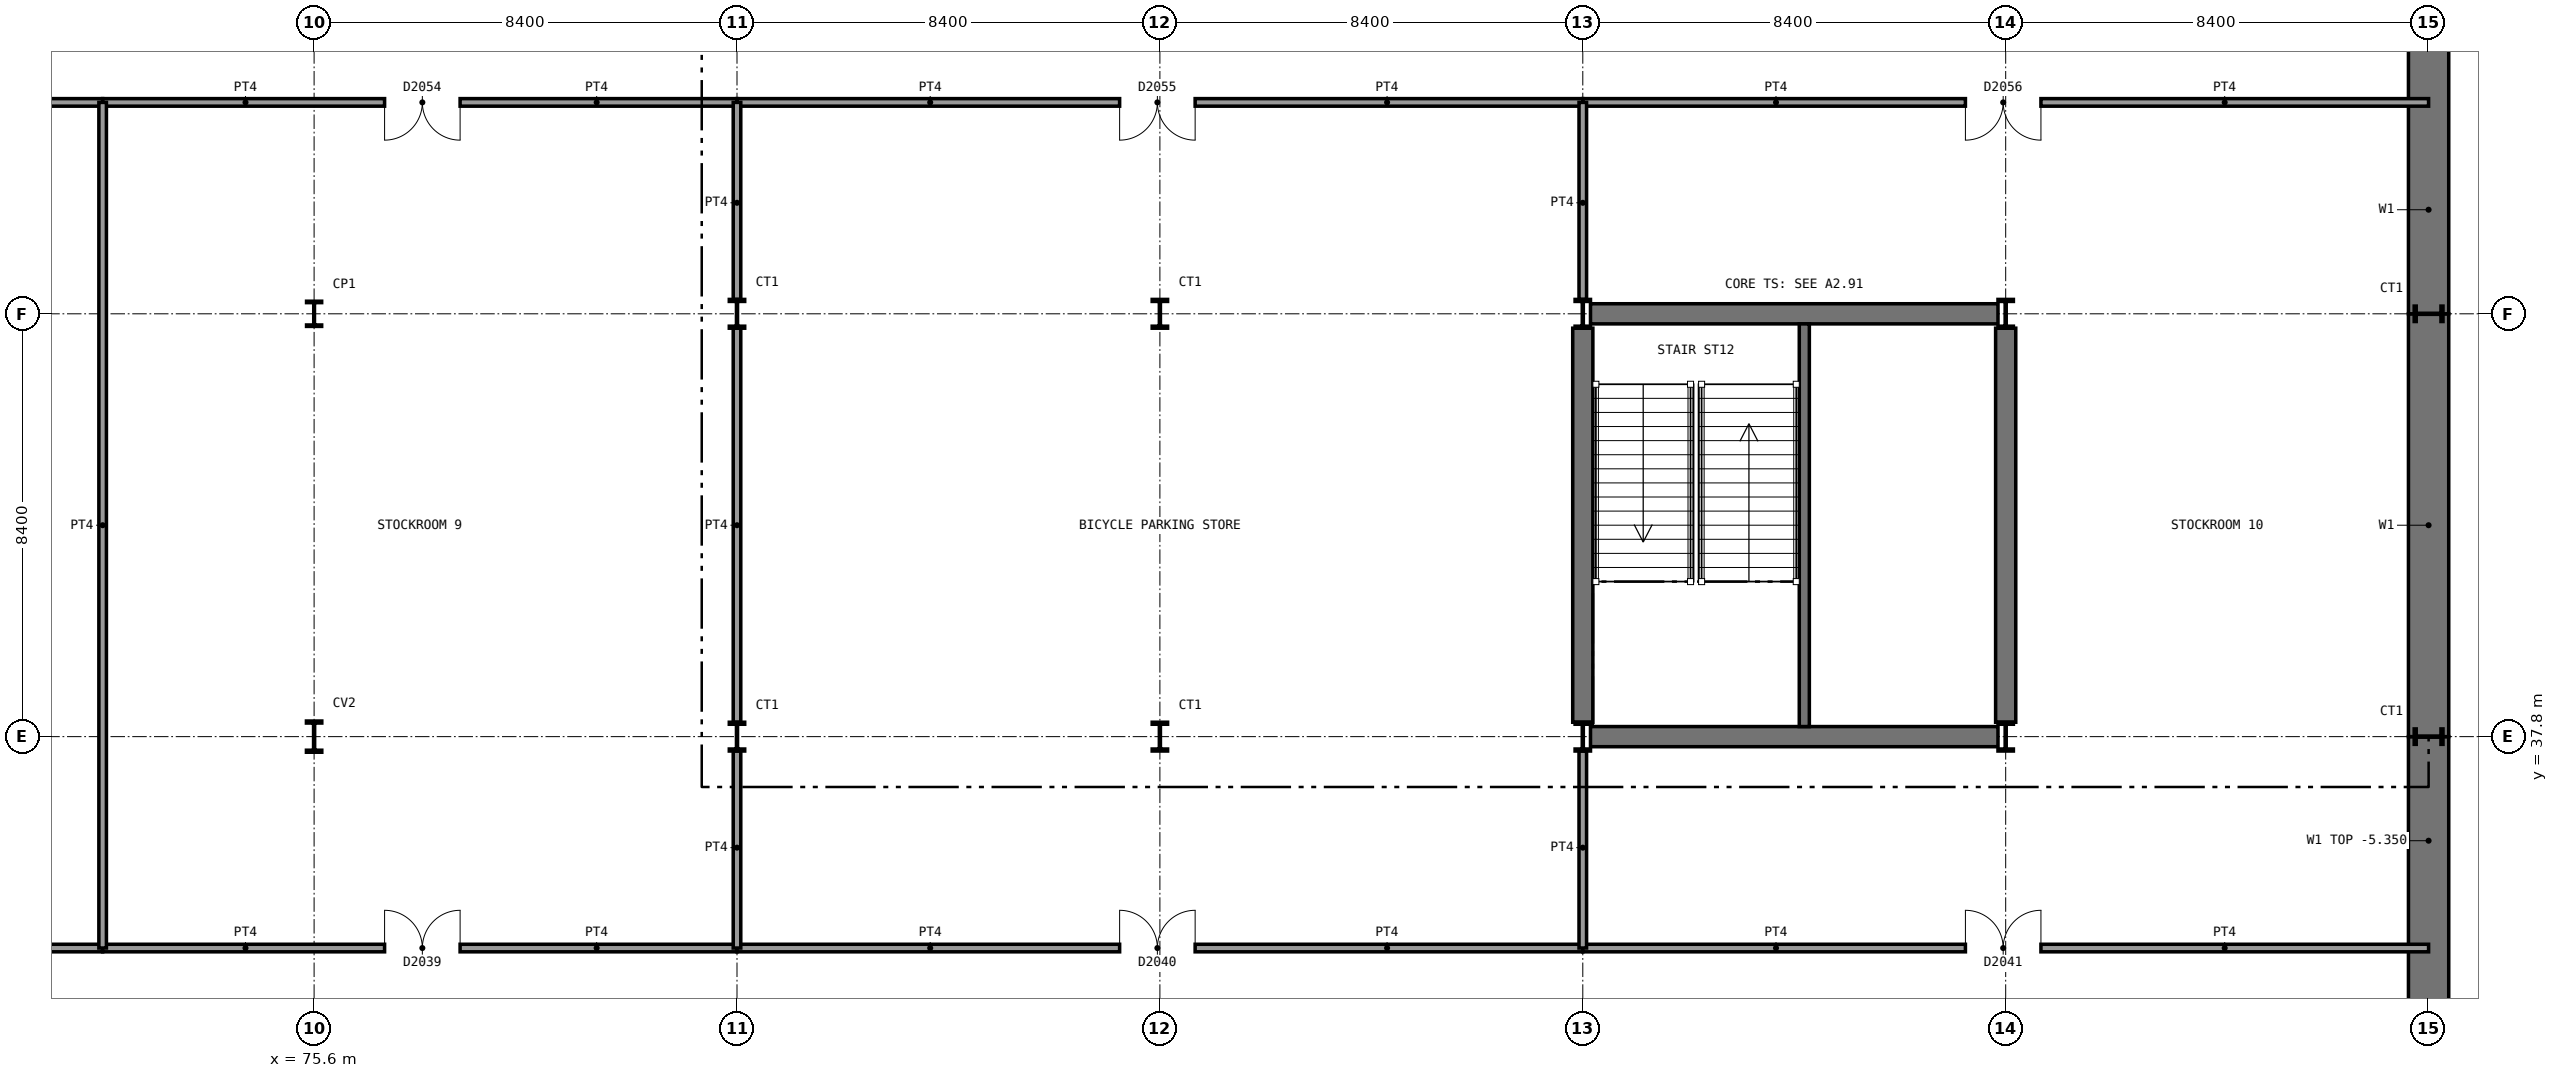
"""IFC4 building model, lengths in metres.
Left out: names, types, materials, properties, quantities, classifications, styles, units other than length and angle.
Written with IfcOpenShell. Run it as: python <this file> out.ifc"""

import sys

from ifc_helpers import new_model, si_unit, direction, frame, frame_2d, origin, origin_2d, place, context, subcontext, project, spatial, rectangle, i_section, extrude, element, fill, save


model = new_model("IFC4")
c1 = context("Model", 3, precision=1e-05, world=origin(), true_north=direction((0.0, 1.0)))
c2 = subcontext(c1, "Body", "Model", "MODEL_VIEW")
j1 = project(units=[si_unit("LENGTHUNIT", "METRE"), si_unit("PLANEANGLEUNIT", "RADIAN")], contexts=[c1])
p1 = place(None, origin())
s1 = spatial("IfcSite", under=j1, at=p1, CompositionType="ELEMENT")
p2 = place(p1, origin())
s2 = spatial("IfcBuilding", under=s1, at=p2, CompositionType="ELEMENT")
p3 = place(p2, frame((0.0, 0.0, -9.9)))
s3 = spatial("IfcBuildingStorey", under=s2, at=p3, CompositionType="ELEMENT", Elevation=-9.9)
p4 = place(p3, frame((117.6, 25.2, 0.0), z_axis=(0.0, 0.0, 1.0), x_axis=(0.0, 1.0, 0.0)))
e1 = element("IfcWall", 1, at=p4, inside=s3, PredefinedType="SOLIDWALL", context=c2, shape_type="SweptSolid", body=[
    extrude(rectangle(XDim=12.6, YDim=0.8, at=frame_2d((6.3, 0.0))), origin(), (0.0, 0.0, 1.0), 4.55),
])
p5 = place(p3, frame((117.6, 37.8, 0.0), z_axis=(0.0, 0.0, 1.0), x_axis=(0.0, 1.0, 0.0)))
e2 = element("IfcWall", 2, at=p5, inside=s3, PredefinedType="SOLIDWALL", context=c2, shape_type="SweptSolid", body=[
    extrude(rectangle(XDim=8.4, YDim=0.8, at=frame_2d((4.2, 0.0))), origin(), (0.0, 0.0, 1.0), 4.65),
])
p6 = place(p3, frame((117.6, 46.2, 0.0), z_axis=(0.0, 0.0, 1.0), x_axis=(0.0, 1.0, 0.0)))
e3 = element("IfcWall", 3, at=p6, inside=s3, PredefinedType="SOLIDWALL", context=c2, shape_type="SweptSolid", body=[
    extrude(rectangle(XDim=8.247, YDim=0.8, at=frame_2d((4.124, 0.0))), origin(), (0.0, 0.0, 1.0), 4.65),
])
for number, where, z_axis, x_axis in (
    (4, (100.953, 37.8, 0.0), (0.0, 0.0, 1.0), (1.0, 0.0, 0.0)),
    (5, (100.953, 46.2, 0.0), (0.0, 0.0, 1.0), (1.0, 0.0, 0.0)),
):
    element("IfcWall", number, at=place(p3, frame(where, z_axis=z_axis, x_axis=x_axis)), inside=s3, PredefinedType="SHEAR", context=c2, shape_type="SweptSolid", body=[
        extrude(rectangle(XDim=8.094, YDim=0.4, at=frame_2d((4.047, 0.0))), origin(), (0.0, 0.0, 1.0), 4.65),
    ])
for number, where, z_axis, x_axis in (
    (6, (100.8, 38.086, 0.0), (0.0, 0.0, 1.0), (0.0, 1.0, 0.0)),
    (7, (109.2, 38.086, 0.0), (0.0, 0.0, 1.0), (0.0, 1.0, 0.0)),
):
    element("IfcWall", number, at=place(p3, frame(where, z_axis=z_axis, x_axis=x_axis)), inside=s3, PredefinedType="SHEAR", context=c2, shape_type="SweptSolid", body=[
        extrude(rectangle(XDim=7.828, YDim=0.4, at=frame_2d((3.914, 0.0))), origin(), (0.0, 0.0, 1.0), 4.65),
    ])
p7 = place(p3, frame((75.6, 37.8, 0.0), z_axis=(0.0, 0.0, 1.0), x_axis=(1.0, 0.0, 0.0)))
e8 = element("IfcColumn", 8, at=p7, inside=s3, PredefinedType="COLUMN", context=c2, shape_type="SweptSolid", body=[
    extrude(i_section(OverallWidth=0.305, OverallDepth=0.62, WebThickness=0.021, FlangeThickness=0.04, FilletRadius=0.027, at=origin_2d()), origin(), (0.0, 0.0, 1.0), 5.0),
])
p8 = place(p3, frame((75.6, 46.2, 0.0), z_axis=(0.0, 0.0, 1.0), x_axis=(1.0, 0.0, 0.0)))
e9 = element("IfcColumn", 9, at=p8, inside=s3, PredefinedType="COLUMN", context=c2, shape_type="SweptSolid", body=[
    extrude(i_section(OverallWidth=0.3, OverallDepth=0.5, WebThickness=0.014, FlangeThickness=0.028, FilletRadius=0.027, at=origin_2d()), origin(), (0.0, 0.0, 1.0), 5.0),
])
for number, where, z_axis, x_axis in (
    (10, (84.0, 37.8, 0.0), (0.0, 0.0, 1.0), (1.0, 0.0, 0.0)),
    (11, (84.0, 46.2, 0.0), (0.0, 0.0, 1.0), (1.0, 0.0, 0.0)),
    (12, (92.4, 37.8, 0.0), (0.0, 0.0, 1.0), (1.0, 0.0, 0.0)),
    (13, (92.4, 46.2, 0.0), (0.0, 0.0, 1.0), (1.0, 0.0, 0.0)),
    (14, (100.8, 37.8, 0.0), (0.0, 0.0, 1.0), (1.0, 0.0, 0.0)),
    (15, (100.8, 46.2, 0.0), (0.0, 0.0, 1.0), (1.0, 0.0, 0.0)),
    (16, (109.2, 37.8, 0.0), (0.0, 0.0, 1.0), (1.0, 0.0, 0.0)),
    (17, (109.2, 46.2, 0.0), (0.0, 0.0, 1.0), (1.0, 0.0, 0.0)),
    (18, (117.6, 37.8, 0.0), (0.0, 0.0, 1.0), (0.0, 1.0, 0.0)),
    (19, (117.6, 46.2, 0.0), (0.0, 0.0, 1.0), (0.0, 1.0, 0.0)),
):
    element("IfcColumn", number, at=place(p3, frame(where, z_axis=z_axis, x_axis=x_axis)), inside=s3, PredefinedType="COLUMN", context=c2, shape_type="SweptSolid", body=[
        extrude(i_section(OverallWidth=0.306, OverallDepth=0.572, WebThickness=0.021, FlangeThickness=0.04, FilletRadius=0.027, at=origin_2d()), origin(), (0.0, 0.0, 1.0), 5.0),
    ])
p9 = place(p3, frame((58.8, 33.6, 0.0), z_axis=(0.0, 0.0, 1.0), x_axis=(1.0, 0.0, 0.0)))
e20 = element("IfcWall", 20, at=p9, inside=s3, PredefinedType="SOLIDWALL", context=c2, shape_type="SweptSolid", body=[
    extrude(rectangle(XDim=12.6, YDim=0.15, at=frame_2d((6.3, 0.0))), origin(), (0.0, 0.0, 1.0), 4.55),
])
p10 = place(p9, frame((5.6, 0.0, 0.0)))
e21 = element("IfcOpeningElement", 21, at=p10, cuts=e20, PredefinedType="OPENING", context=c2, shape_type="SweptSolid", body=[
    extrude(rectangle(XDim=1.5, YDim=2.1, at=frame_2d((0.75, 1.05))), frame((0.0, 0.085, 0.0), z_axis=(0.0, -1.0, 0.0), x_axis=(1.0, 0.0, 0.0)), (0.0, 0.0, 1.0), 0.17),
])
p11 = place(p3, frame((71.4, 33.6, 0.0), z_axis=(0.0, 0.0, 1.0), x_axis=(1.0, 0.0, 0.0)))
e22 = element("IfcWall", 22, at=p11, inside=s3, PredefinedType="SOLIDWALL", context=c2, shape_type="SweptSolid", body=[
    extrude(rectangle(XDim=12.6, YDim=0.15, at=frame_2d((6.3, 0.0))), origin(), (0.0, 0.0, 1.0), 4.55),
])
p12 = place(p11, frame((5.6, 0.0, 0.0)))
e23 = element("IfcOpeningElement", 23, at=p12, cuts=e22, PredefinedType="OPENING", context=c2, shape_type="SweptSolid", body=[
    extrude(rectangle(XDim=1.5, YDim=2.1, at=frame_2d((0.75, 1.05))), frame((0.0, 0.085, 0.0), z_axis=(0.0, -1.0, 0.0), x_axis=(1.0, 0.0, 0.0)), (0.0, 0.0, 1.0), 0.17),
])
p13 = place(p3, frame((84.0, 33.6, 0.0), z_axis=(0.0, 0.0, 1.0), x_axis=(1.0, 0.0, 0.0)))
e24 = element("IfcWall", 24, at=p13, inside=s3, PredefinedType="SOLIDWALL", context=c2, shape_type="SweptSolid", body=[
    extrude(rectangle(XDim=16.8, YDim=0.15, at=frame_2d((8.4, 0.0))), origin(), (0.0, 0.0, 1.0), 4.55),
])
p14 = place(p13, frame((7.6, 0.0, 0.0)))
e25 = element("IfcOpeningElement", 25, at=p14, cuts=e24, PredefinedType="OPENING", context=c2, shape_type="SweptSolid", body=[
    extrude(rectangle(XDim=1.5, YDim=2.1, at=frame_2d((0.75, 1.05))), frame((0.0, 0.085, 0.0), z_axis=(0.0, -1.0, 0.0), x_axis=(1.0, 0.0, 0.0)), (0.0, 0.0, 1.0), 0.17),
])
p15 = place(p3, frame((100.8, 33.6, 0.0), z_axis=(0.0, 0.0, 1.0), x_axis=(1.0, 0.0, 0.0)))
e26 = element("IfcWall", 26, at=p15, inside=s3, PredefinedType="SOLIDWALL", context=c2, shape_type="SweptSolid", body=[
    extrude(rectangle(XDim=16.8, YDim=0.15, at=frame_2d((8.4, 0.0))), origin(), (0.0, 0.0, 1.0), 4.55),
])
p16 = place(p15, frame((7.6, 0.0, 0.0)))
e27 = element("IfcOpeningElement", 27, at=p16, cuts=e26, PredefinedType="OPENING", context=c2, shape_type="SweptSolid", body=[
    extrude(rectangle(XDim=1.5, YDim=2.1, at=frame_2d((0.75, 1.05))), frame((0.0, 0.085, 0.0), z_axis=(0.0, -1.0, 0.0), x_axis=(1.0, 0.0, 0.0)), (0.0, 0.0, 1.0), 0.17),
])
p17 = place(p3, frame((58.8, 50.4, 0.0), z_axis=(0.0, 0.0, 1.0), x_axis=(1.0, 0.0, 0.0)))
e28 = element("IfcWall", 28, at=p17, inside=s3, PredefinedType="SOLIDWALL", context=c2, shape_type="SweptSolid", body=[
    extrude(rectangle(XDim=12.6, YDim=0.15, at=frame_2d((6.3, 0.0))), origin(), (0.0, 0.0, 1.0), 4.55),
])
p18 = place(p17, frame((5.6, 0.0, 0.0)))
e29 = element("IfcOpeningElement", 29, at=p18, cuts=e28, PredefinedType="OPENING", context=c2, shape_type="SweptSolid", body=[
    extrude(rectangle(XDim=1.5, YDim=2.1, at=frame_2d((0.75, 1.05))), frame((0.0, 0.085, 0.0), z_axis=(0.0, -1.0, 0.0), x_axis=(1.0, 0.0, 0.0)), (0.0, 0.0, 1.0), 0.17),
])
p19 = place(p3, frame((71.4, 50.4, 0.0), z_axis=(0.0, 0.0, 1.0), x_axis=(1.0, 0.0, 0.0)))
e30 = element("IfcWall", 30, at=p19, inside=s3, PredefinedType="SOLIDWALL", context=c2, shape_type="SweptSolid", body=[
    extrude(rectangle(XDim=12.6, YDim=0.15, at=frame_2d((6.3, 0.0))), origin(), (0.0, 0.0, 1.0), 4.55),
])
p20 = place(p19, frame((5.6, 0.0, 0.0)))
e31 = element("IfcOpeningElement", 31, at=p20, cuts=e30, PredefinedType="OPENING", context=c2, shape_type="SweptSolid", body=[
    extrude(rectangle(XDim=1.5, YDim=2.1, at=frame_2d((0.75, 1.05))), frame((0.0, 0.085, 0.0), z_axis=(0.0, -1.0, 0.0), x_axis=(1.0, 0.0, 0.0)), (0.0, 0.0, 1.0), 0.17),
])
p21 = place(p3, frame((84.0, 50.4, 0.0), z_axis=(0.0, 0.0, 1.0), x_axis=(1.0, 0.0, 0.0)))
e32 = element("IfcWall", 32, at=p21, inside=s3, PredefinedType="SOLIDWALL", context=c2, shape_type="SweptSolid", body=[
    extrude(rectangle(XDim=16.8, YDim=0.15, at=frame_2d((8.4, 0.0))), origin(), (0.0, 0.0, 1.0), 4.55),
])
p22 = place(p21, frame((7.6, 0.0, 0.0)))
e33 = element("IfcOpeningElement", 33, at=p22, cuts=e32, PredefinedType="OPENING", context=c2, shape_type="SweptSolid", body=[
    extrude(rectangle(XDim=1.5, YDim=2.1, at=frame_2d((0.75, 1.05))), frame((0.0, 0.085, 0.0), z_axis=(0.0, -1.0, 0.0), x_axis=(1.0, 0.0, 0.0)), (0.0, 0.0, 1.0), 0.17),
])
p23 = place(p3, frame((100.8, 50.4, 0.0), z_axis=(0.0, 0.0, 1.0), x_axis=(1.0, 0.0, 0.0)))
e34 = element("IfcWall", 34, at=p23, inside=s3, PredefinedType="SOLIDWALL", context=c2, shape_type="SweptSolid", body=[
    extrude(rectangle(XDim=16.8, YDim=0.15, at=frame_2d((8.4, 0.0))), origin(), (0.0, 0.0, 1.0), 4.55),
])
p24 = place(p23, frame((7.6, 0.0, 0.0)))
e35 = element("IfcOpeningElement", 35, at=p24, cuts=e34, PredefinedType="OPENING", context=c2, shape_type="SweptSolid", body=[
    extrude(rectangle(XDim=1.5, YDim=2.1, at=frame_2d((0.75, 1.05))), frame((0.0, 0.085, 0.0), z_axis=(0.0, -1.0, 0.0), x_axis=(1.0, 0.0, 0.0)), (0.0, 0.0, 1.0), 0.17),
])
p25 = place(p3, frame((71.4, 33.6, 0.0), z_axis=(0.0, 0.0, 1.0), x_axis=(0.0, 1.0, 0.0)))
e36 = element("IfcWall", 36, at=p25, inside=s3, PredefinedType="SOLIDWALL", context=c2, shape_type="SweptSolid", body=[
    extrude(rectangle(XDim=16.8, YDim=0.15, at=frame_2d((8.4, 0.0))), origin(), (0.0, 0.0, 1.0), 4.55),
])
p26 = place(p3, frame((84.0, 33.6, 0.0), z_axis=(0.0, 0.0, 1.0), x_axis=(0.0, 1.0, 0.0)))
e37 = element("IfcWall", 37, at=p26, inside=s3, PredefinedType="SOLIDWALL", context=c2, shape_type="SweptSolid", body=[
    extrude(rectangle(XDim=3.914, YDim=0.15, at=frame_2d((1.957, 0.0))), origin(), (0.0, 0.0, 1.0), 4.55),
])
p27 = place(p3, frame((84.0, 38.086, 0.0), z_axis=(0.0, 0.0, 1.0), x_axis=(0.0, 1.0, 0.0)))
e38 = element("IfcWall", 38, at=p27, inside=s3, PredefinedType="SOLIDWALL", context=c2, shape_type="SweptSolid", body=[
    extrude(rectangle(XDim=7.828, YDim=0.15, at=frame_2d((3.914, 0.0))), origin(), (0.0, 0.0, 1.0), 4.55),
])
for number, where, z_axis, x_axis in (
    (39, (84.0, 46.486, 0.0), (0.0, 0.0, 1.0), (0.0, 1.0, 0.0)),
    (40, (100.8, 33.6, 0.0), (0.0, 0.0, 1.0), (0.0, 1.0, 0.0)),
    (41, (100.8, 46.486, 0.0), (0.0, 0.0, 1.0), (0.0, 1.0, 0.0)),
):
    element("IfcWall", number, at=place(p3, frame(where, z_axis=z_axis, x_axis=x_axis)), inside=s3, PredefinedType="SOLIDWALL", context=c2, shape_type="SweptSolid", body=[
        extrude(rectangle(XDim=3.914, YDim=0.15, at=frame_2d((1.957, 0.0))), origin(), (0.0, 0.0, 1.0), 4.55),
    ])
p28 = place(p3, frame((105.2, 38.0, 0.0), z_axis=(0.0, 0.0, 1.0), x_axis=(0.0, 1.0, 0.0)))
e42 = element("IfcWall", 42, at=p28, inside=s3, PredefinedType="SHEAR", context=c2, shape_type="SweptSolid", body=[
    extrude(rectangle(XDim=8.0, YDim=0.2, at=frame_2d((4.0, 0.0))), origin(), (0.0, 0.0, 1.0), 4.65),
])
p29 = place(p12, origin())
e43 = element("IfcDoor", 43, at=p29, inside=s3, OperationType="DOUBLE_DOOR_SINGLE_SWING", PredefinedType="DOOR", context=c2, shape_type="SweptSolid", body=[
    extrude(rectangle(XDim=1.5, YDim=2.1, at=frame_2d((0.75, 1.05))), frame((0.0, 0.025, 0.0), z_axis=(0.0, -1.0, 0.0), x_axis=(1.0, 0.0, 0.0)), (0.0, 0.0, 1.0), 0.05),
])
fill(e23, e43)
p30 = place(p14, origin())
e44 = element("IfcDoor", 44, at=p30, inside=s3, OperationType="DOUBLE_DOOR_SINGLE_SWING", PredefinedType="DOOR", context=c2, shape_type="SweptSolid", body=[
    extrude(rectangle(XDim=1.5, YDim=2.1, at=frame_2d((0.75, 1.05))), frame((0.0, 0.025, 0.0), z_axis=(0.0, -1.0, 0.0), x_axis=(1.0, 0.0, 0.0)), (0.0, 0.0, 1.0), 0.05),
])
fill(e25, e44)
p31 = place(p16, origin())
e45 = element("IfcDoor", 45, at=p31, inside=s3, OperationType="DOUBLE_DOOR_SINGLE_SWING", PredefinedType="DOOR", context=c2, shape_type="SweptSolid", body=[
    extrude(rectangle(XDim=1.5, YDim=2.1, at=frame_2d((0.75, 1.05))), frame((0.0, 0.025, 0.0), z_axis=(0.0, -1.0, 0.0), x_axis=(1.0, 0.0, 0.0)), (0.0, 0.0, 1.0), 0.05),
])
fill(e27, e45)
p32 = place(p20, frame((1.5, 0.0, 0.0), z_axis=(0.0, 0.0, 1.0), x_axis=(-1.0, 0.0, 0.0)))
e46 = element("IfcDoor", 46, at=p32, inside=s3, OperationType="DOUBLE_DOOR_SINGLE_SWING", PredefinedType="DOOR", context=c2, shape_type="SweptSolid", body=[
    extrude(rectangle(XDim=1.5, YDim=2.1, at=frame_2d((0.75, 1.05))), frame((0.0, 0.025, 0.0), z_axis=(0.0, -1.0, 0.0), x_axis=(1.0, 0.0, 0.0)), (0.0, 0.0, 1.0), 0.05),
])
fill(e31, e46)
p33 = place(p22, frame((1.5, 0.0, 0.0), z_axis=(0.0, 0.0, 1.0), x_axis=(-1.0, 0.0, 0.0)))
e47 = element("IfcDoor", 47, at=p33, inside=s3, OperationType="DOUBLE_DOOR_SINGLE_SWING", PredefinedType="DOOR", context=c2, shape_type="SweptSolid", body=[
    extrude(rectangle(XDim=1.5, YDim=2.1, at=frame_2d((0.75, 1.05))), frame((0.0, 0.025, 0.0), z_axis=(0.0, -1.0, 0.0), x_axis=(1.0, 0.0, 0.0)), (0.0, 0.0, 1.0), 0.05),
])
fill(e33, e47)
p34 = place(p24, frame((1.5, 0.0, 0.0), z_axis=(0.0, 0.0, 1.0), x_axis=(-1.0, 0.0, 0.0)))
e48 = element("IfcDoor", 48, at=p34, inside=s3, OperationType="DOUBLE_DOOR_SINGLE_SWING", PredefinedType="DOOR", context=c2, shape_type="SweptSolid", body=[
    extrude(rectangle(XDim=1.5, YDim=2.1, at=frame_2d((0.75, 1.05))), frame((0.0, 0.025, 0.0), z_axis=(0.0, -1.0, 0.0), x_axis=(1.0, 0.0, 0.0)), (0.0, 0.0, 1.0), 0.05),
])
fill(e35, e48)
save(model, sys.argv[1])
